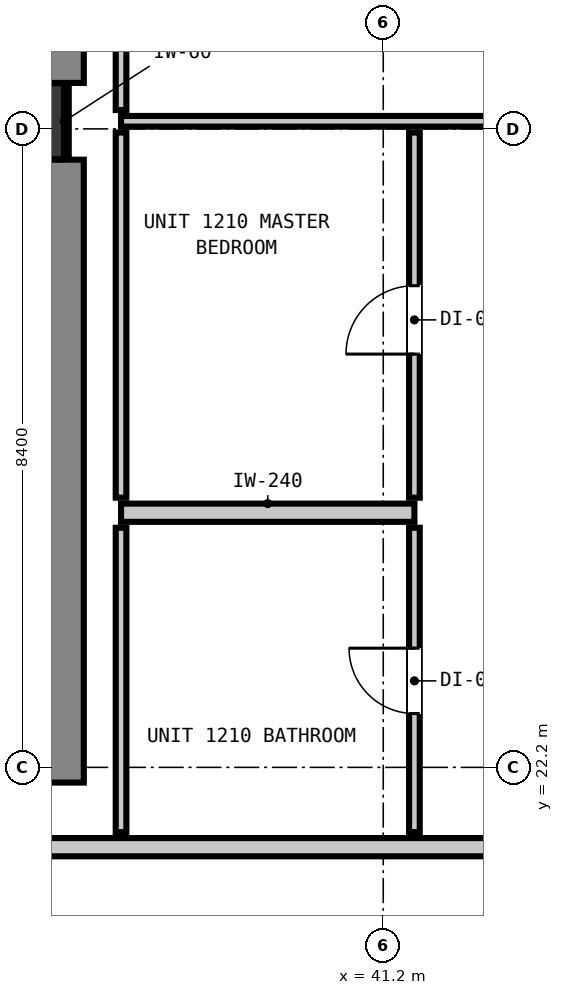
"""IFC4 building model, lengths in metres.
Left out: names, types, materials, properties, quantities, classifications, styles, units other than length and angle.
Written with IfcOpenShell. Run it as: python <this file> out.ifc"""

import sys

from ifc_helpers import new_model, si_unit, direction, frame, frame_2d, origin, origin_2d, place, context, subcontext, project, spatial, rectangle, extrude, element, fill, save


model = new_model("IFC4")
c1 = context("Model", 3, precision=1e-05, world=origin(), true_north=direction((0.0, 1.0)))
c2 = subcontext(c1, "Body", "Model", "MODEL_VIEW")
j1 = project(units=[si_unit("LENGTHUNIT", "METRE"), si_unit("PLANEANGLEUNIT", "RADIAN")], contexts=[c1])
p1 = place(None, origin())
s1 = spatial("IfcSite", under=j1, at=p1, CompositionType="ELEMENT")
p2 = place(p1, origin())
s2 = spatial("IfcBuilding", under=s1, at=p2, CompositionType="ELEMENT")
p3 = place(p2, frame((0.0, 0.0, 45.24)))
s3 = spatial("IfcBuildingStorey", under=s2, at=p3, CompositionType="ELEMENT", Elevation=45.24)
p4 = place(p3, frame((36.5, 30.7, 0.0), z_axis=(0.0, 0.0, 1.0), x_axis=(1.0, 0.0, 0.0)))
e1 = element("IfcColumn", 1, at=p4, inside=s3, PredefinedType="COLUMN", context=c2, shape_type="SweptSolid", body=[
    extrude(rectangle(XDim=1.0, YDim=1.0, at=origin_2d()), origin(), (0.0, 0.0, 1.0), 3.32),
])
p5 = place(p3, frame((36.66, 22.0, 0.0), z_axis=(0.0, 0.0, 1.0), x_axis=(0.0, 1.0, 0.0)))
e2 = element("IfcWall", 2, at=p5, inside=s3, PredefinedType="SHEAR", context=c2, shape_type="SweptSolid", body=[
    extrude(rectangle(XDim=8.195, YDim=1.2, at=frame_2d((4.098, 0.0))), origin(), (0.0, 0.0, 1.0), 3.32),
])
p6 = place(p3, frame((36.66, 31.205, 0.0), z_axis=(0.0, 0.0, 1.0), x_axis=(0.0, 1.0, 0.0)))
e3 = element("IfcWall", 3, at=p6, inside=s3, PredefinedType="SHEAR", context=c2, shape_type="SweptSolid", body=[
    extrude(rectangle(XDim=8.195, YDim=1.2, at=frame_2d((4.097, 0.0))), origin(), (0.0, 0.0, 1.0), 3.32),
])
p7 = place(p3, frame((10.15, 21.15, 0.0), z_axis=(0.0, 0.0, 1.0), x_axis=(1.0, 0.0, 0.0)))
e4 = element("IfcWall", 4, at=p7, inside=s3, PredefinedType="PARTITIONING", context=c2, shape_type="SweptSolid", body=[
    extrude(rectangle(XDim=40.023, YDim=0.24, at=frame_2d((20.012, 0.0))), origin(), (0.0, 0.0, 1.0), 3.06),
])
p8 = place(p7, frame((8.06, 0.0, 0.0)))
e5 = element("IfcOpeningElement", 5, at=p8, cuts=e4, PredefinedType="OPENING", context=c2, shape_type="SweptSolid", body=[
    extrude(rectangle(XDim=1.1, YDim=2.15, at=frame_2d((0.55, 1.075))), frame((0.0, 0.13, 0.0), z_axis=(0.0, -1.0, 0.0), x_axis=(1.0, 0.0, 0.0)), (0.0, 0.0, 1.0), 0.26),
])
p9 = place(p7, frame((0.324, 0.0, 0.0)))
e6 = element("IfcOpeningElement", 6, at=p9, cuts=e4, PredefinedType="OPENING", context=c2, shape_type="SweptSolid", body=[
    extrude(rectangle(XDim=1.4, YDim=2.15, at=frame_2d((0.7, 1.075))), frame((0.0, 0.13, 0.0), z_axis=(0.0, -1.0, 0.0), x_axis=(1.0, 0.0, 0.0)), (0.0, 0.0, 1.0), 0.26),
])
p10 = place(p7, frame((33.574, 0.0, 0.0)))
e7 = element("IfcOpeningElement", 7, at=p10, cuts=e4, PredefinedType="OPENING", context=c2, shape_type="SweptSolid", body=[
    extrude(rectangle(XDim=1.0, YDim=2.15, at=frame_2d((0.5, 1.075))), frame((0.0, 0.13, 0.0), z_axis=(0.0, -1.0, 0.0), x_axis=(1.0, 0.0, 0.0)), (0.0, 0.0, 1.0), 0.26),
])
p11 = place(p3, frame((37.75, 25.55, 0.0), z_axis=(0.0, 0.0, 1.0), x_axis=(1.0, 0.0, 0.0)))
e8 = element("IfcWall", 8, at=p11, inside=s3, PredefinedType="PARTITIONING", context=c2, shape_type="SweptSolid", body=[
    extrude(rectangle(XDim=3.86, YDim=0.24, at=frame_2d((1.93, 0.0))), origin(), (0.0, 0.0, 1.0), 3.06),
])
p12 = place(p3, frame((37.75, 30.7, 0.0), z_axis=(0.0, 0.0, 1.0), x_axis=(1.0, 0.0, 0.0)))
e9 = element("IfcWall", 9, at=p12, inside=s3, PredefinedType="PARTITIONING", context=c2, shape_type="SweptSolid", body=[
    extrude(rectangle(XDim=11.318, YDim=0.14, at=frame_2d((5.659, 0.0))), origin(), (0.0, 0.0, 1.0), 2.295),
])
p13 = place(p3, frame((37.75, 21.348, 0.0), z_axis=(0.0, 0.0, 1.0), x_axis=(0.0, 1.0, 0.0)))
e10 = element("IfcWall", 10, at=p13, inside=s3, PredefinedType="PARTITIONING", context=c2, shape_type="SweptSolid", body=[
    extrude(rectangle(XDim=4.004, YDim=0.14, at=frame_2d((2.002, 0.0))), origin(), (0.0, 0.0, 1.0), 3.06),
])
p14 = place(p3, frame((37.75, 25.748, 0.0), z_axis=(0.0, 0.0, 1.0), x_axis=(0.0, 1.0, 0.0)))
e11 = element("IfcWall", 11, at=p14, inside=s3, PredefinedType="PARTITIONING", context=c2, shape_type="SweptSolid", body=[
    extrude(rectangle(XDim=4.804, YDim=0.14, at=frame_2d((2.402, 0.0))), origin(), (0.0, 0.0, 1.0), 3.06),
])
p15 = place(p3, frame((37.75, 30.848, 0.0), z_axis=(0.0, 0.0, 1.0), x_axis=(0.0, 1.0, 0.0)))
e12 = element("IfcWall", 12, at=p15, inside=s3, PredefinedType="PARTITIONING", context=c2, shape_type="SweptSolid", body=[
    extrude(rectangle(XDim=5.034, YDim=0.14, at=frame_2d((2.517, 0.0))), origin(), (0.0, 0.0, 1.0), 3.06),
])
p16 = place(p3, frame((41.61, 21.348, 0.0), z_axis=(0.0, 0.0, 1.0), x_axis=(0.0, 1.0, 0.0)))
e13 = element("IfcWall", 13, at=p16, inside=s3, PredefinedType="PARTITIONING", context=c2, shape_type="SweptSolid", body=[
    extrude(rectangle(XDim=4.004, YDim=0.14, at=frame_2d((2.002, 0.0))), origin(), (0.0, 0.0, 1.0), 3.06),
])
p17 = place(p16, frame((1.56, 0.0, 0.0)))
e14 = element("IfcOpeningElement", 14, at=p17, cuts=e13, PredefinedType="OPENING", context=c2, shape_type="SweptSolid", body=[
    extrude(rectangle(XDim=0.86, YDim=2.02, at=frame_2d((0.43, 1.01))), frame((0.0, 0.08, 0.0), z_axis=(0.0, -1.0, 0.0), x_axis=(1.0, 0.0, 0.0)), (0.0, 0.0, 1.0), 0.16),
])
p18 = place(p3, frame((41.61, 25.748, 0.0), z_axis=(0.0, 0.0, 1.0), x_axis=(0.0, 1.0, 0.0)))
e15 = element("IfcWall", 15, at=p18, inside=s3, PredefinedType="PARTITIONING", context=c2, shape_type="SweptSolid", body=[
    extrude(rectangle(XDim=4.804, YDim=0.14, at=frame_2d((2.402, 0.0))), origin(), (0.0, 0.0, 1.0), 3.06),
])
p19 = place(p18, frame((1.889, 0.0, 0.0)))
e16 = element("IfcOpeningElement", 16, at=p19, cuts=e15, PredefinedType="OPENING", context=c2, shape_type="SweptSolid", body=[
    extrude(rectangle(XDim=0.9, YDim=2.1, at=frame_2d((0.45, 1.05))), frame((0.0, 0.08, 0.0), z_axis=(0.0, -1.0, 0.0), x_axis=(1.0, 0.0, 0.0)), (0.0, 0.0, 1.0), 0.16),
])
p20 = place(p3, frame((37.032, 30.21, 0.0), z_axis=(0.0, 0.0, 1.0), x_axis=(0.0, 1.0, 0.0)))
e17 = element("IfcWall", 17, at=p20, inside=s3, PredefinedType="PARTITIONING", context=c2, shape_type="SweptSolid", body=[
    extrude(rectangle(XDim=0.98, YDim=0.06, at=frame_2d((0.49, 0.0))), origin(), (0.0, 0.0, 1.0), 1.45),
])
p21 = place(p17, origin())
e18 = element("IfcDoor", 18, at=p21, inside=s3, OperationType="SINGLE_SWING_RIGHT", PredefinedType="DOOR", context=c2, shape_type="SweptSolid", body=[
    extrude(rectangle(XDim=0.86, YDim=2.02, at=frame_2d((0.43, 1.01))), frame((0.0, 0.025, 0.0), z_axis=(0.0, -1.0, 0.0), x_axis=(1.0, 0.0, 0.0)), (0.0, 0.0, 1.0), 0.05),
])
fill(e14, e18)
p22 = place(p19, origin())
e19 = element("IfcDoor", 19, at=p22, inside=s3, OperationType="SINGLE_SWING_LEFT", PredefinedType="DOOR", context=c2, shape_type="SweptSolid", body=[
    extrude(rectangle(XDim=0.9, YDim=2.1, at=frame_2d((0.45, 1.05))), frame((0.0, 0.025, 0.0), z_axis=(0.0, -1.0, 0.0), x_axis=(1.0, 0.0, 0.0)), (0.0, 0.0, 1.0), 0.05),
])
fill(e16, e19)
save(model, sys.argv[1])
